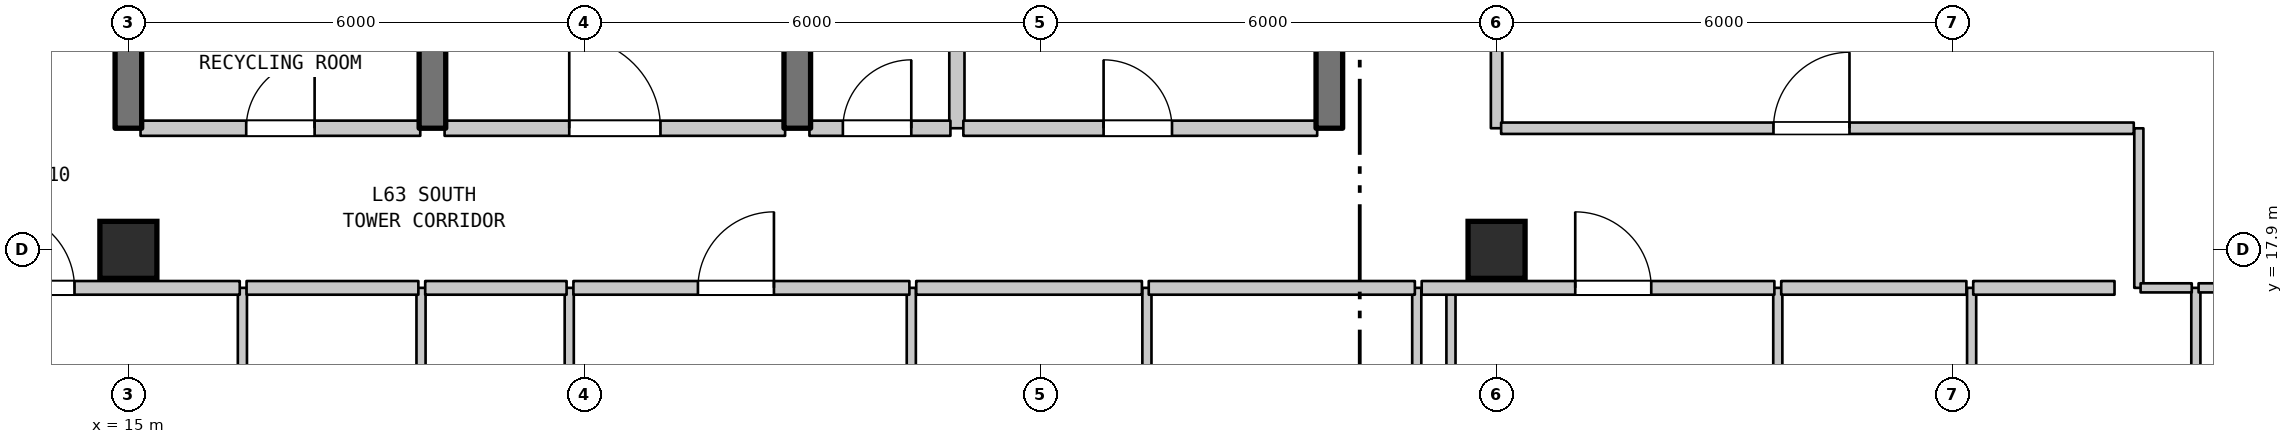
"""IFC4 building model, lengths in metres.
Left out: names, types, materials, properties, quantities, classifications, styles, units other than length and angle.
Written with IfcOpenShell. Run it as: python <this file> out.ifc"""

import sys

from ifc_helpers import new_model, si_unit, direction, frame, frame_2d, origin, origin_2d, place, context, subcontext, project, spatial, rectangle, extrude, element, fill, save


model = new_model("IFC4")
c1 = context("Model", 3, precision=1e-05, world=origin(), true_north=direction((0.0, 1.0)))
c2 = subcontext(c1, "Body", "Model", "MODEL_VIEW")
j1 = project(units=[si_unit("LENGTHUNIT", "METRE"), si_unit("PLANEANGLEUNIT", "RADIAN")], contexts=[c1])
p1 = place(None, origin())
s1 = spatial("IfcSite", under=j1, at=p1, CompositionType="ELEMENT")
p2 = place(p1, origin())
s2 = spatial("IfcBuilding", under=s1, at=p2, CompositionType="ELEMENT")
p3 = place(p2, frame((0.0, 0.0, 254.7)))
s3 = spatial("IfcBuildingStorey", under=s2, at=p3, CompositionType="ELEMENT", Elevation=254.7)
for number, where, z_axis, x_axis in (
    (1, (15.0, 17.9, 0.0), (0.0, 0.0, 1.0), (1.0, 0.0, 0.0)),
    (2, (33.0, 17.9, 0.0), (0.0, 0.0, 1.0), (1.0, 0.0, 0.0)),
):
    element("IfcColumn", number, at=place(p3, frame(where, z_axis=z_axis, x_axis=x_axis)), inside=s3, PredefinedType="COLUMN", context=c2, shape_type="SweptSolid", body=[
        extrude(rectangle(XDim=0.75, YDim=0.75, at=origin_2d()), origin(), (0.0, 0.0, 1.0), 3.7),
    ])
p4 = place(p3, frame((15.0, 19.5, 0.0), z_axis=(0.0, 0.0, 1.0), x_axis=(0.0, 1.0, 0.0)))
e3 = element("IfcWall", 3, at=p4, inside=s3, PredefinedType="SHEAR", context=c2, shape_type="SweptSolid", body=[
    extrude(rectangle(XDim=3.2, YDim=0.35, at=frame_2d((1.6, 0.0))), origin(), (0.0, 0.0, 1.0), 3.39),
])
p5 = place(p3, frame((16.5, 14.2, 0.0), z_axis=(0.0, 0.0, 1.0), x_axis=(0.0, 1.0, 0.0)))
e4 = element("IfcWall", 4, at=p5, inside=s3, PredefinedType="PARTITIONING", context=c2, shape_type="SweptSolid", body=[
    extrude(rectangle(XDim=3.2, YDim=0.12, at=frame_2d((1.6, 0.0))), origin(), (0.0, 0.0, 1.0), 3.39),
])
p6 = place(p5, frame((1.15, 0.0, 0.0)))
e5 = element("IfcOpeningElement", 5, at=p6, cuts=e4, PredefinedType="OPENING", context=c2, shape_type="SweptSolid", body=[
    extrude(rectangle(XDim=0.9, YDim=2.15, at=frame_2d((0.45, 1.075))), frame((0.0, 0.07, 0.0), z_axis=(0.0, -1.0, 0.0), x_axis=(1.0, 0.0, 0.0)), (0.0, 0.0, 1.0), 0.14),
])
p7 = place(p3, frame((18.85, 14.2, 0.0), z_axis=(0.0, 0.0, 1.0), x_axis=(0.0, 1.0, 0.0)))
e6 = element("IfcWall", 6, at=p7, inside=s3, PredefinedType="PARTITIONING", context=c2, shape_type="SweptSolid", body=[
    extrude(rectangle(XDim=3.2, YDim=0.12, at=frame_2d((1.6, 0.0))), origin(), (0.0, 0.0, 1.0), 3.39),
])
p8 = place(p3, frame((19.0, 19.5, 0.0), z_axis=(0.0, 0.0, 1.0), x_axis=(0.0, 1.0, 0.0)))
e7 = element("IfcWall", 7, at=p8, inside=s3, PredefinedType="SHEAR", context=c2, shape_type="SweptSolid", body=[
    extrude(rectangle(XDim=3.2, YDim=0.35, at=frame_2d((1.6, 0.0))), origin(), (0.0, 0.0, 1.0), 3.39),
])
p9 = place(p3, frame((20.8, 7.075, 0.0), z_axis=(0.0, 0.0, 1.0), x_axis=(0.0, 1.0, 0.0)))
e8 = element("IfcWall", 8, at=p9, inside=s3, PredefinedType="PARTITIONING", context=c2, shape_type="SweptSolid", body=[
    extrude(rectangle(XDim=10.325, YDim=0.12, at=frame_2d((5.163, 0.0))), origin(), (0.0, 0.0, 1.0), 3.39),
])
p10 = place(p3, frame((23.8, 19.5, 0.0), z_axis=(0.0, 0.0, 1.0), x_axis=(0.0, 1.0, 0.0)))
e9 = element("IfcWall", 9, at=p10, inside=s3, PredefinedType="SHEAR", context=c2, shape_type="SweptSolid", body=[
    extrude(rectangle(XDim=6.6, YDim=0.35, at=frame_2d((3.3, 0.0))), origin(), (0.0, 0.0, 1.0), 3.39),
])
p11 = place(p10, frame((4.304, 0.0, 0.0)))
e10 = element("IfcOpeningElement", 10, at=p11, cuts=e9, PredefinedType="OPENING", context=c2, shape_type="SweptSolid", body=[
    extrude(rectangle(XDim=0.9, YDim=2.15, at=frame_2d((0.45, 1.075))), frame((0.0, 0.185, 0.0), z_axis=(0.0, -1.0, 0.0), x_axis=(1.0, 0.0, 0.0)), (0.0, 0.0, 1.0), 0.37),
])
p12 = place(p3, frame((25.3, 13.62, 0.0), z_axis=(0.0, 0.0, 1.0), x_axis=(0.0, 1.0, 0.0)))
e11 = element("IfcWall", 11, at=p12, inside=s3, PredefinedType="PARTITIONING", context=c2, shape_type="SweptSolid", body=[
    extrude(rectangle(XDim=3.78, YDim=0.12, at=frame_2d((1.89, 0.0))), origin(), (0.0, 0.0, 1.0), 3.39),
])
p13 = place(p3, frame((25.9, 19.5, 0.0), z_axis=(0.0, 0.0, 1.0), x_axis=(0.0, 1.0, 0.0)))
e12 = element("IfcWall", 12, at=p13, inside=s3, PredefinedType="STANDARD", context=c2, shape_type="SweptSolid", body=[
    extrude(rectangle(XDim=3.2, YDim=0.2, at=frame_2d((1.6, 0.0))), origin(), (0.0, 0.0, 1.0), 3.39),
])
p14 = place(p3, frame((28.4, 13.62, 0.0), z_axis=(0.0, 0.0, 1.0), x_axis=(0.0, 1.0, 0.0)))
e13 = element("IfcWall", 13, at=p14, inside=s3, PredefinedType="PARTITIONING", context=c2, shape_type="SweptSolid", body=[
    extrude(rectangle(XDim=3.78, YDim=0.12, at=frame_2d((1.89, 0.0))), origin(), (0.0, 0.0, 1.0), 3.39),
])
p15 = place(p3, frame((30.8, 19.5, 0.0), z_axis=(0.0, 0.0, 1.0), x_axis=(0.0, 1.0, 0.0)))
e14 = element("IfcWall", 14, at=p15, inside=s3, PredefinedType="SHEAR", context=c2, shape_type="SweptSolid", body=[
    extrude(rectangle(XDim=3.2, YDim=0.35, at=frame_2d((1.6, 0.0))), origin(), (0.0, 0.0, 1.0), 3.39),
])
p16 = place(p3, frame((31.95, 13.62, 0.0), z_axis=(0.0, 0.0, 1.0), x_axis=(0.0, 1.0, 0.0)))
e15 = element("IfcWall", 15, at=p16, inside=s3, PredefinedType="PARTITIONING", context=c2, shape_type="SweptSolid", body=[
    extrude(rectangle(XDim=3.78, YDim=0.12, at=frame_2d((1.89, 0.0))), origin(), (0.0, 0.0, 1.0), 3.39),
])
p17 = place(p3, frame((32.4, 6.71, 0.0), z_axis=(0.0, 0.0, 1.0), x_axis=(0.0, 1.0, 0.0)))
e16 = element("IfcWall", 16, at=p17, inside=s3, PredefinedType="PARTITIONING", context=c2, shape_type="SweptSolid", body=[
    extrude(rectangle(XDim=10.69, YDim=0.12, at=frame_2d((5.345, 0.0))), origin(), (0.0, 0.0, 1.0), 3.39),
])
p18 = place(p3, frame((33.0, 19.5, 0.0), z_axis=(0.0, 0.0, 1.0), x_axis=(0.0, 1.0, 0.0)))
e17 = element("IfcWall", 17, at=p18, inside=s3, PredefinedType="STANDARD", context=c2, shape_type="SweptSolid", body=[
    extrude(rectangle(XDim=8.4, YDim=0.15, at=frame_2d((4.2, 0.0))), origin(), (0.0, 0.0, 1.0), 3.1),
])
for number, where, z_axis, x_axis in (
    (18, (36.7, 13.62, 0.0), (0.0, 0.0, 1.0), (0.0, 1.0, 0.0)),
    (19, (39.25, 13.62, 0.0), (0.0, 0.0, 1.0), (0.0, 1.0, 0.0)),
):
    element("IfcWall", number, at=place(p3, frame(where, z_axis=z_axis, x_axis=x_axis)), inside=s3, PredefinedType="PARTITIONING", context=c2, shape_type="SweptSolid", body=[
        extrude(rectangle(XDim=3.78, YDim=0.12, at=frame_2d((1.89, 0.0))), origin(), (0.0, 0.0, 1.0), 3.39),
    ])
p19 = place(p3, frame((41.45, 17.4, 0.0), z_axis=(0.0, 0.0, 1.0), x_axis=(0.0, 1.0, 0.0)))
e20 = element("IfcWall", 20, at=p19, inside=s3, PredefinedType="PARTITIONING", context=c2, shape_type="SweptSolid", body=[
    extrude(rectangle(XDim=2.099, YDim=0.12, at=frame_2d((1.05, 0.0))), origin(), (0.0, 0.0, 1.0), 3.39),
])
p20 = place(p3, frame((42.2, 13.62, 0.0), z_axis=(0.0, 0.0, 1.0), x_axis=(0.0, 1.0, 0.0)))
e21 = element("IfcWall", 21, at=p20, inside=s3, PredefinedType="PARTITIONING", context=c2, shape_type="SweptSolid", body=[
    extrude(rectangle(XDim=3.78, YDim=0.12, at=frame_2d((1.89, 0.0))), origin(), (0.0, 0.0, 1.0), 3.39),
])
p21 = place(p3, frame((12.975, 17.4, 0.0), z_axis=(0.0, 0.0, 1.0), x_axis=(1.0, 0.0, 0.0)))
e22 = element("IfcWall", 22, at=p21, inside=s3, PredefinedType="STANDARD", context=c2, shape_type="SweptSolid", body=[
    extrude(rectangle(XDim=3.49, YDim=0.18, at=frame_2d((1.745, 0.0))), origin(), (0.0, 0.0, 1.0), 3.39),
])
p22 = place(p21, frame((0.316, 0.0, 0.0)))
e23 = element("IfcOpeningElement", 23, at=p22, cuts=e22, PredefinedType="OPENING", context=c2, shape_type="SweptSolid", body=[
    extrude(rectangle(XDim=1.0, YDim=2.15, at=frame_2d((0.5, 1.075))), frame((0.0, 0.1, 0.0), z_axis=(0.0, -1.0, 0.0), x_axis=(1.0, 0.0, 0.0)), (0.0, 0.0, 1.0), 0.2),
])
p23 = place(p3, frame((16.555, 17.4, 0.0), z_axis=(0.0, 0.0, 1.0), x_axis=(1.0, 0.0, 0.0)))
e24 = element("IfcWall", 24, at=p23, inside=s3, PredefinedType="STANDARD", context=c2, shape_type="SweptSolid", body=[
    extrude(rectangle(XDim=2.26, YDim=0.18, at=frame_2d((1.13, 0.0))), origin(), (0.0, 0.0, 1.0), 3.39),
])
p24 = place(p3, frame((18.905, 17.4, 0.0), z_axis=(0.0, 0.0, 1.0), x_axis=(1.0, 0.0, 0.0)))
e25 = element("IfcWall", 25, at=p24, inside=s3, PredefinedType="STANDARD", context=c2, shape_type="SweptSolid", body=[
    extrude(rectangle(XDim=1.86, YDim=0.18, at=frame_2d((0.93, 0.0))), origin(), (0.0, 0.0, 1.0), 3.39),
])
p25 = place(p3, frame((20.855, 17.4, 0.0), z_axis=(0.0, 0.0, 1.0), x_axis=(1.0, 0.0, 0.0)))
e26 = element("IfcWall", 26, at=p25, inside=s3, PredefinedType="STANDARD", context=c2, shape_type="SweptSolid", body=[
    extrude(rectangle(XDim=4.42, YDim=0.18, at=frame_2d((2.21, 0.0))), origin(), (0.0, 0.0, 1.0), 3.39),
])
p26 = place(p25, frame((1.638, 0.0, 0.0)))
e27 = element("IfcOpeningElement", 27, at=p26, cuts=e26, PredefinedType="OPENING", context=c2, shape_type="SweptSolid", body=[
    extrude(rectangle(XDim=1.0, YDim=2.15, at=frame_2d((0.5, 1.075))), frame((0.0, 0.1, 0.0), z_axis=(0.0, -1.0, 0.0), x_axis=(1.0, 0.0, 0.0)), (0.0, 0.0, 1.0), 0.2),
])
p27 = place(p3, frame((25.365, 17.4, 0.0), z_axis=(0.0, 0.0, 1.0), x_axis=(1.0, 0.0, 0.0)))
e28 = element("IfcWall", 28, at=p27, inside=s3, PredefinedType="STANDARD", context=c2, shape_type="SweptSolid", body=[
    extrude(rectangle(XDim=2.969, YDim=0.18, at=frame_2d((1.484, 0.0))), origin(), (0.0, 0.0, 1.0), 3.39),
])
p28 = place(p3, frame((28.424, 17.4, 0.0), z_axis=(0.0, 0.0, 1.0), x_axis=(1.0, 0.0, 0.0)))
e29 = element("IfcWall", 29, at=p28, inside=s3, PredefinedType="STANDARD", context=c2, shape_type="SweptSolid", body=[
    extrude(rectangle(XDim=3.501, YDim=0.18, at=frame_2d((1.75, 0.0))), origin(), (0.0, 0.0, 1.0), 3.39),
])
p29 = place(p3, frame((32.015, 17.4, 0.0), z_axis=(0.0, 0.0, 1.0), x_axis=(1.0, 0.0, 0.0)))
e30 = element("IfcWall", 30, at=p29, inside=s3, PredefinedType="STANDARD", context=c2, shape_type="SweptSolid", body=[
    extrude(rectangle(XDim=4.64, YDim=0.18, at=frame_2d((2.32, 0.0))), origin(), (0.0, 0.0, 1.0), 3.39),
])
p30 = place(p29, frame((2.02, 0.0, 0.0)))
e31 = element("IfcOpeningElement", 31, at=p30, cuts=e30, PredefinedType="OPENING", context=c2, shape_type="SweptSolid", body=[
    extrude(rectangle(XDim=1.0, YDim=2.15, at=frame_2d((0.5, 1.075))), frame((0.0, 0.1, 0.0), z_axis=(0.0, -1.0, 0.0), x_axis=(1.0, 0.0, 0.0)), (0.0, 0.0, 1.0), 0.2),
])
p31 = place(p3, frame((36.745, 17.4, 0.0), z_axis=(0.0, 0.0, 1.0), x_axis=(1.0, 0.0, 0.0)))
e32 = element("IfcWall", 32, at=p31, inside=s3, PredefinedType="STANDARD", context=c2, shape_type="SweptSolid", body=[
    extrude(rectangle(XDim=2.436, YDim=0.18, at=frame_2d((1.218, 0.0))), origin(), (0.0, 0.0, 1.0), 3.39),
])
p32 = place(p3, frame((39.271, 17.4, 0.0), z_axis=(0.0, 0.0, 1.0), x_axis=(1.0, 0.0, 0.0)))
e33 = element("IfcWall", 33, at=p32, inside=s3, PredefinedType="STANDARD", context=c2, shape_type="SweptSolid", body=[
    extrude(rectangle(XDim=1.859, YDim=0.18, at=frame_2d((0.929, 0.0))), origin(), (0.0, 0.0, 1.0), 3.39),
])
p33 = place(p3, frame((41.473, 17.4, 0.0), z_axis=(0.0, 0.0, 1.0), x_axis=(1.0, 0.0, 0.0)))
e34 = element("IfcWall", 34, at=p33, inside=s3, PredefinedType="PARTITIONING", context=c2, shape_type="SweptSolid", body=[
    extrude(rectangle(XDim=0.673, YDim=0.12, at=frame_2d((0.336, 0.0))), origin(), (0.0, 0.0, 1.0), 3.39),
])
p34 = place(p3, frame((42.236, 17.4, 0.0), z_axis=(0.0, 0.0, 1.0), x_axis=(1.0, 0.0, 0.0)))
e35 = element("IfcWall", 35, at=p34, inside=s3, PredefinedType="PARTITIONING", context=c2, shape_type="SweptSolid", body=[
    extrude(rectangle(XDim=1.268, YDim=0.12, at=frame_2d((0.634, 0.0))), origin(), (0.0, 0.0, 1.0), 3.39),
])
p35 = place(p3, frame((15.16, 19.5, 0.0), z_axis=(0.0, 0.0, 1.0), x_axis=(1.0, 0.0, 0.0)))
e36 = element("IfcWall", 36, at=p35, inside=s3, PredefinedType="STANDARD", context=c2, shape_type="SweptSolid", body=[
    extrude(rectangle(XDim=3.68, YDim=0.2, at=frame_2d((1.84, 0.0))), origin(), (0.0, 0.0, 1.0), 3.39),
])
p36 = place(p35, frame((1.39, 0.0, 0.0)))
e37 = element("IfcOpeningElement", 37, at=p36, cuts=e36, PredefinedType="OPENING", context=c2, shape_type="SweptSolid", body=[
    extrude(rectangle(XDim=0.9, YDim=2.15, at=frame_2d((0.45, 1.075))), frame((0.0, 0.11, 0.0), z_axis=(0.0, -1.0, 0.0), x_axis=(1.0, 0.0, 0.0)), (0.0, 0.0, 1.0), 0.22),
])
p37 = place(p3, frame((19.16, 19.5, 0.0), z_axis=(0.0, 0.0, 1.0), x_axis=(1.0, 0.0, 0.0)))
e38 = element("IfcWall", 38, at=p37, inside=s3, PredefinedType="STANDARD", context=c2, shape_type="SweptSolid", body=[
    extrude(rectangle(XDim=4.48, YDim=0.2, at=frame_2d((2.24, 0.0))), origin(), (0.0, 0.0, 1.0), 3.39),
])
p38 = place(p37, frame((1.64, 0.0, 0.0)))
e39 = element("IfcOpeningElement", 39, at=p38, cuts=e38, PredefinedType="OPENING", context=c2, shape_type="SweptSolid", body=[
    extrude(rectangle(XDim=1.2, YDim=2.2, at=frame_2d((0.6, 1.1))), frame((0.0, 0.11, 0.0), z_axis=(0.0, -1.0, 0.0), x_axis=(1.0, 0.0, 0.0)), (0.0, 0.0, 1.0), 0.22),
])
p39 = place(p3, frame((23.96, 19.5, 0.0), z_axis=(0.0, 0.0, 1.0), x_axis=(1.0, 0.0, 0.0)))
e40 = element("IfcWall", 40, at=p39, inside=s3, PredefinedType="STANDARD", context=c2, shape_type="SweptSolid", body=[
    extrude(rectangle(XDim=1.855, YDim=0.2, at=frame_2d((0.927, 0.0))), origin(), (0.0, 0.0, 1.0), 3.39),
])
p40 = place(p39, frame((0.44, 0.0, 0.0)))
e41 = element("IfcOpeningElement", 41, at=p40, cuts=e40, PredefinedType="OPENING", context=c2, shape_type="SweptSolid", body=[
    extrude(rectangle(XDim=0.9, YDim=2.15, at=frame_2d((0.45, 1.075))), frame((0.0, 0.11, 0.0), z_axis=(0.0, -1.0, 0.0), x_axis=(1.0, 0.0, 0.0)), (0.0, 0.0, 1.0), 0.22),
])
p41 = place(p3, frame((25.985, 19.5, 0.0), z_axis=(0.0, 0.0, 1.0), x_axis=(1.0, 0.0, 0.0)))
e42 = element("IfcWall", 42, at=p41, inside=s3, PredefinedType="STANDARD", context=c2, shape_type="SweptSolid", body=[
    extrude(rectangle(XDim=4.655, YDim=0.2, at=frame_2d((2.327, 0.0))), origin(), (0.0, 0.0, 1.0), 3.39),
])
p42 = place(p41, frame((1.845, 0.0, 0.0)))
e43 = element("IfcOpeningElement", 43, at=p42, cuts=e42, PredefinedType="OPENING", context=c2, shape_type="SweptSolid", body=[
    extrude(rectangle(XDim=0.9, YDim=2.15, at=frame_2d((0.45, 1.075))), frame((0.0, 0.11, 0.0), z_axis=(0.0, -1.0, 0.0), x_axis=(1.0, 0.0, 0.0)), (0.0, 0.0, 1.0), 0.22),
])
p43 = place(p3, frame((33.06, 19.5, 0.0), z_axis=(0.0, 0.0, 1.0), x_axis=(1.0, 0.0, 0.0)))
e44 = element("IfcWall", 44, at=p43, inside=s3, PredefinedType="STANDARD", context=c2, shape_type="SweptSolid", body=[
    extrude(rectangle(XDim=8.323, YDim=0.15, at=frame_2d((4.162, 0.0))), origin(), (0.0, 0.0, 1.0), 3.39),
])
p44 = place(p43, frame((3.583, 0.0, 0.0)))
e45 = element("IfcOpeningElement", 45, at=p44, cuts=e44, PredefinedType="OPENING", context=c2, shape_type="SweptSolid", body=[
    extrude(rectangle(XDim=1.0, YDim=2.15, at=frame_2d((0.5, 1.075))), frame((0.0, 0.085, 0.0), z_axis=(0.0, -1.0, 0.0), x_axis=(1.0, 0.0, 0.0)), (0.0, 0.0, 1.0), 0.17),
])
p45 = place(p22, origin())
e46 = element("IfcDoor", 46, at=p45, inside=s3, OperationType="SINGLE_SWING_LEFT", PredefinedType="DOOR", context=c2, shape_type="SweptSolid", body=[
    extrude(rectangle(XDim=1.0, YDim=2.15, at=frame_2d((0.5, 1.075))), frame((0.0, 0.025, 0.0), z_axis=(0.0, -1.0, 0.0), x_axis=(1.0, 0.0, 0.0)), (0.0, 0.0, 1.0), 0.05),
])
fill(e23, e46)
p46 = place(p26, origin())
e47 = element("IfcDoor", 47, at=p46, inside=s3, OperationType="SINGLE_SWING_RIGHT", PredefinedType="DOOR", context=c2, shape_type="SweptSolid", body=[
    extrude(rectangle(XDim=1.0, YDim=2.15, at=frame_2d((0.5, 1.075))), frame((0.0, 0.025, 0.0), z_axis=(0.0, -1.0, 0.0), x_axis=(1.0, 0.0, 0.0)), (0.0, 0.0, 1.0), 0.05),
])
fill(e27, e47)
p47 = place(p30, origin())
e48 = element("IfcDoor", 48, at=p47, inside=s3, OperationType="SINGLE_SWING_LEFT", PredefinedType="DOOR", context=c2, shape_type="SweptSolid", body=[
    extrude(rectangle(XDim=1.0, YDim=2.15, at=frame_2d((0.5, 1.075))), frame((0.0, 0.025, 0.0), z_axis=(0.0, -1.0, 0.0), x_axis=(1.0, 0.0, 0.0)), (0.0, 0.0, 1.0), 0.05),
])
fill(e31, e48)
p48 = place(p36, origin())
e49 = element("IfcDoor", 49, at=p48, inside=s3, OperationType="SINGLE_SWING_RIGHT", PredefinedType="DOOR", context=c2, shape_type="SweptSolid", body=[
    extrude(rectangle(XDim=0.9, YDim=2.15, at=frame_2d((0.45, 1.075))), frame((0.0, 0.025, 0.0), z_axis=(0.0, -1.0, 0.0), x_axis=(1.0, 0.0, 0.0)), (0.0, 0.0, 1.0), 0.05),
])
fill(e37, e49)
p49 = place(p38, origin())
e50 = element("IfcDoor", 50, at=p49, inside=s3, OperationType="SINGLE_SWING_LEFT", PredefinedType="DOOR", context=c2, shape_type="SweptSolid", body=[
    extrude(rectangle(XDim=1.2, YDim=2.2, at=frame_2d((0.6, 1.1))), frame((0.0, 0.025, 0.0), z_axis=(0.0, -1.0, 0.0), x_axis=(1.0, 0.0, 0.0)), (0.0, 0.0, 1.0), 0.05),
])
fill(e39, e50)
p50 = place(p40, origin())
e51 = element("IfcDoor", 51, at=p50, inside=s3, OperationType="SINGLE_SWING_RIGHT", PredefinedType="DOOR", context=c2, shape_type="SweptSolid", body=[
    extrude(rectangle(XDim=0.9, YDim=2.15, at=frame_2d((0.45, 1.075))), frame((0.0, 0.025, 0.0), z_axis=(0.0, -1.0, 0.0), x_axis=(1.0, 0.0, 0.0)), (0.0, 0.0, 1.0), 0.05),
])
fill(e41, e51)
p51 = place(p42, origin())
e52 = element("IfcDoor", 52, at=p51, inside=s3, OperationType="SINGLE_SWING_LEFT", PredefinedType="DOOR", context=c2, shape_type="SweptSolid", body=[
    extrude(rectangle(XDim=0.9, YDim=2.15, at=frame_2d((0.45, 1.075))), frame((0.0, 0.025, 0.0), z_axis=(0.0, -1.0, 0.0), x_axis=(1.0, 0.0, 0.0)), (0.0, 0.0, 1.0), 0.05),
])
fill(e43, e52)
p52 = place(p44, origin())
e53 = element("IfcDoor", 53, at=p52, inside=s3, OperationType="SINGLE_SWING_RIGHT", PredefinedType="DOOR", context=c2, shape_type="SweptSolid", body=[
    extrude(rectangle(XDim=1.0, YDim=2.15, at=frame_2d((0.5, 1.075))), frame((0.0, 0.025, 0.0), z_axis=(0.0, -1.0, 0.0), x_axis=(1.0, 0.0, 0.0)), (0.0, 0.0, 1.0), 0.05),
])
fill(e45, e53)
save(model, sys.argv[1])
